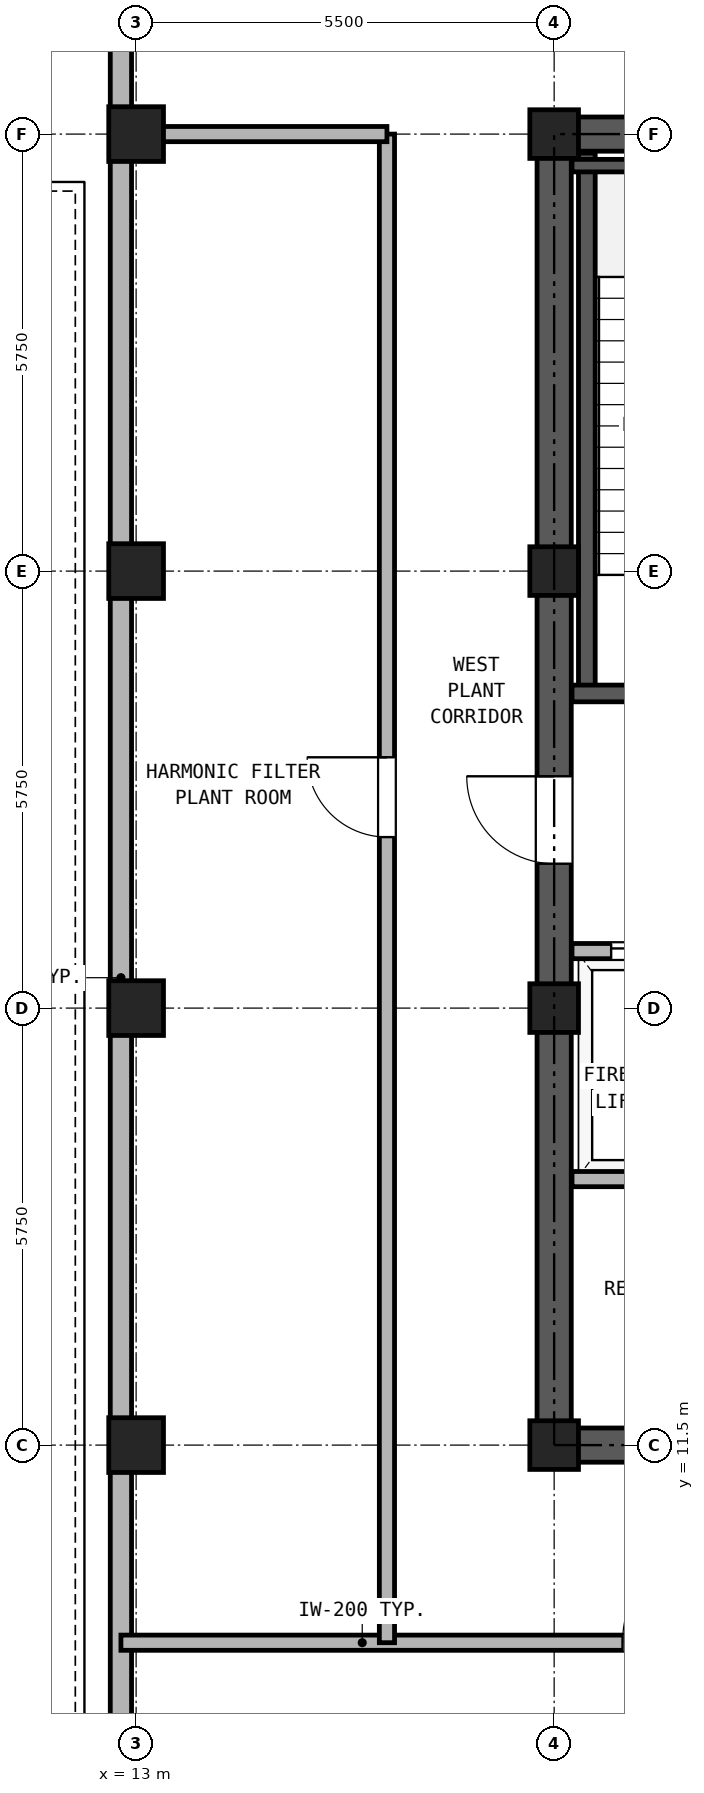
"""IFC4 building model, lengths in metres.
Left out: names, types, materials, properties, quantities, classifications, styles, units other than length and angle.
Written with IfcOpenShell. Run it as: python <this file> out.ifc"""

import sys

from ifc_helpers import new_model, si_unit, direction, frame, frame_2d, origin, origin_2d, place, context, subcontext, project, spatial, rectangle, hollow_rectangle, extrude, source, transform, mapped, element, fill, save


model = new_model("IFC4")
c1 = context("Model", 3, precision=1e-05, world=origin(), true_north=direction((0.0, 1.0)))
c2 = subcontext(c1, "Body", "Model", "MODEL_VIEW")
j1 = project(units=[si_unit("LENGTHUNIT", "METRE"), si_unit("PLANEANGLEUNIT", "RADIAN")], contexts=[c1])
p1 = place(None, origin())
s1 = spatial("IfcSite", under=j1, at=p1, CompositionType="ELEMENT")
p2 = place(p1, origin())
s2 = spatial("IfcBuilding", under=s1, at=p2, CompositionType="ELEMENT")
p3 = place(p2, frame((0.0, 0.0, 188.1)))
s3 = spatial("IfcBuildingStorey", under=s2, at=p3, CompositionType="ELEMENT", Elevation=188.1)
m1 = source(origin(), c2, "Body", "SweptSolid", [
    extrude(hollow_rectangle(XDim=0.72, YDim=0.72, WallThickness=0.04, at=origin_2d()), origin(), (0.0, 0.0, 1.0), 4.85),
])
for number, where, z_axis, x_axis in (
    (1, (13.0, 11.5, 0.0), (0.0, 0.0, 1.0), (1.0, 0.0, 0.0)),
    (2, (13.0, 17.25, 0.0), (0.0, 0.0, 1.0), (1.0, 0.0, 0.0)),
    (3, (13.0, 23.0, 0.0), (0.0, 0.0, 1.0), (1.0, 0.0, 0.0)),
    (4, (13.0, 28.75, 0.0), (0.0, 0.0, 1.0), (1.0, 0.0, 0.0)),
):
    element("IfcColumn", number, at=place(p3, frame(where, z_axis=z_axis, x_axis=x_axis)), inside=s3, PredefinedType="COLUMN", context=c2, shape_type="MappedRepresentation", body=[
        mapped(m1, transform((0.0, 0.0, 0.0), x_axis=(1.0, 0.0, 0.0), y_axis=(0.0, 1.0, 0.0), z_axis=(0.0, 0.0, 1.0), scale=1.0)),
    ])
m2 = source(origin(), c2, "Body", "SweptSolid", [
    extrude(hollow_rectangle(XDim=0.64, YDim=0.64, WallThickness=0.035, at=origin_2d()), origin(), (0.0, 0.0, 1.0), 4.85),
])
for number, where, z_axis, x_axis in (
    (5, (18.5, 11.5, 0.0), (0.0, 0.0, 1.0), (1.0, 0.0, 0.0)),
    (6, (18.5, 17.25, 0.0), (0.0, 0.0, 1.0), (1.0, 0.0, 0.0)),
    (7, (18.5, 23.0, 0.0), (0.0, 0.0, 1.0), (1.0, 0.0, 0.0)),
    (8, (18.5, 28.75, 0.0), (0.0, 0.0, 1.0), (1.0, 0.0, 0.0)),
):
    element("IfcColumn", number, at=place(p3, frame(where, z_axis=z_axis, x_axis=x_axis)), inside=s3, PredefinedType="COLUMN", context=c2, shape_type="MappedRepresentation", body=[
        mapped(m2, transform((0.0, 0.0, 0.0), x_axis=(1.0, 0.0, 0.0), y_axis=(0.0, 1.0, 0.0), z_axis=(0.0, 0.0, 1.0), scale=1.0)),
    ])
p4 = place(p3, frame((18.275, 11.5, 0.0), z_axis=(0.0, 0.0, 1.0), x_axis=(1.0, 0.0, 0.0)))
e9 = element("IfcWall", 9, at=p4, inside=s3, PredefinedType="SHEAR", context=c2, shape_type="SweptSolid", body=[
    extrude(rectangle(XDim=10.45, YDim=0.45, at=frame_2d((5.225, 0.0))), origin(), (0.0, 0.0, 1.0), 4.85),
])
p5 = place(p4, frame((1.825, 0.0, 0.0)))
e10 = element("IfcOpeningElement", 10, at=p5, cuts=e9, PredefinedType="OPENING", context=c2, shape_type="SweptSolid", body=[
    extrude(rectangle(XDim=0.95, YDim=2.15, at=frame_2d((0.475, 1.075))), frame((0.0, 0.235, 0.0), z_axis=(0.0, -1.0, 0.0), x_axis=(1.0, 0.0, 0.0)), (0.0, 0.0, 1.0), 0.47),
])
p6 = place(p4, frame((5.325, 0.0, 0.0)))
e11 = element("IfcOpeningElement", 11, at=p6, cuts=e9, PredefinedType="OPENING", context=c2, shape_type="SweptSolid", body=[
    extrude(rectangle(XDim=0.95, YDim=2.15, at=frame_2d((0.475, 1.075))), frame((0.0, 0.235, 0.0), z_axis=(0.0, -1.0, 0.0), x_axis=(1.0, 0.0, 0.0)), (0.0, 0.0, 1.0), 0.47),
])
p7 = place(p4, frame((8.225, 0.0, 0.0)))
e12 = element("IfcOpeningElement", 12, at=p7, cuts=e9, PredefinedType="OPENING", context=c2, shape_type="SweptSolid", body=[
    extrude(rectangle(XDim=1.1, YDim=2.25, at=frame_2d((0.55, 1.125))), frame((0.0, 0.235, 0.0), z_axis=(0.0, -1.0, 0.0), x_axis=(1.0, 0.0, 0.0)), (0.0, 0.0, 1.0), 0.47),
])
p8 = place(p3, frame((18.275, 28.75, 0.0), z_axis=(0.0, 0.0, 1.0), x_axis=(1.0, 0.0, 0.0)))
e13 = element("IfcWall", 13, at=p8, inside=s3, PredefinedType="SHEAR", context=c2, shape_type="SweptSolid", body=[
    extrude(rectangle(XDim=10.45, YDim=0.45, at=frame_2d((5.225, 0.0))), origin(), (0.0, 0.0, 1.0), 4.85),
])
p9 = place(p8, frame((4.105, 0.0, 0.0)))
e14 = element("IfcOpeningElement", 14, at=p9, cuts=e13, PredefinedType="OPENING", context=c2, shape_type="SweptSolid", body=[
    extrude(rectangle(XDim=0.9, YDim=2.05, at=frame_2d((0.45, 1.025))), frame((0.0, 0.235, 0.0), z_axis=(0.0, -1.0, 0.0), x_axis=(1.0, 0.0, 0.0)), (0.0, 0.0, 1.0), 0.47),
])
p10 = place(p8, frame((5.645, 0.0, 0.0)))
e15 = element("IfcOpeningElement", 15, at=p10, cuts=e13, PredefinedType="OPENING", context=c2, shape_type="SweptSolid", body=[
    extrude(rectangle(XDim=0.9, YDim=2.05, at=frame_2d((0.45, 1.025))), frame((0.0, 0.235, 0.0), z_axis=(0.0, -1.0, 0.0), x_axis=(1.0, 0.0, 0.0)), (0.0, 0.0, 1.0), 0.47),
])
p11 = place(p3, frame((18.5, 11.725, 0.0), z_axis=(0.0, 0.0, 1.0), x_axis=(0.0, 1.0, 0.0)))
e16 = element("IfcWall", 16, at=p11, inside=s3, PredefinedType="SHEAR", context=c2, shape_type="SweptSolid", body=[
    extrude(rectangle(XDim=16.8, YDim=0.45, at=frame_2d((8.4, 0.0))), origin(), (0.0, 0.0, 1.0), 4.85),
])
p12 = place(p11, frame((7.425, 0.0, 0.0)))
e17 = element("IfcOpeningElement", 17, at=p12, cuts=e16, PredefinedType="OPENING", context=c2, shape_type="SweptSolid", body=[
    extrude(rectangle(XDim=1.15, YDim=2.2, at=frame_2d((0.575, 1.1))), frame((0.0, 0.235, 0.0), z_axis=(0.0, -1.0, 0.0), x_axis=(1.0, 0.0, 0.0)), (0.0, 0.0, 1.0), 0.47),
])
p13 = place(p3, frame((18.93, 21.39, 0.0), z_axis=(0.0, 0.0, 1.0), x_axis=(0.0, 1.0, 0.0)))
e18 = element("IfcWall", 18, at=p13, inside=s3, PredefinedType="SOLIDWALL", context=c2, shape_type="SweptSolid", body=[
    extrude(rectangle(XDim=7.11, YDim=0.22, at=frame_2d((3.555, 0.0))), origin(), (0.0, 0.0, 1.0), 4.85),
])
p14 = place(p3, frame((18.735, 28.335, 0.0), z_axis=(0.0, 0.0, 1.0), x_axis=(1.0, 0.0, 0.0)))
e19 = element("IfcWall", 19, at=p14, inside=s3, PredefinedType="PARTITIONING", context=c2, shape_type="SweptSolid", body=[
    extrude(rectangle(XDim=3.375, YDim=0.165, at=frame_2d((1.688, 0.0))), origin(), (0.0, 0.0, 1.0), 4.85),
])
p15 = place(p3, frame((18.735, 21.39, 0.0), z_axis=(0.0, 0.0, 1.0), x_axis=(1.0, 0.0, 0.0)))
e20 = element("IfcWall", 20, at=p15, inside=s3, PredefinedType="SOLIDWALL", context=c2, shape_type="SweptSolid", body=[
    extrude(rectangle(XDim=6.395, YDim=0.22, at=frame_2d((3.197, 0.0))), origin(), (0.0, 0.0, 1.0), 4.85),
])
p16 = place(p15, frame((1.115, 0.0, 0.0)))
e21 = element("IfcOpeningElement", 21, at=p16, cuts=e20, PredefinedType="OPENING", context=c2, shape_type="SweptSolid", body=[
    extrude(rectangle(XDim=1.15, YDim=2.2, at=frame_2d((0.575, 1.1))), frame((0.0, 0.12, 0.0), z_axis=(0.0, -1.0, 0.0), x_axis=(1.0, 0.0, 0.0)), (0.0, 0.0, 1.0), 0.24),
])
p17 = place(p15, frame((4.845, 0.0, 0.0)))
e22 = element("IfcOpeningElement", 22, at=p17, cuts=e20, PredefinedType="OPENING", context=c2, shape_type="SweptSolid", body=[
    extrude(rectangle(XDim=1.1, YDim=2.25, at=frame_2d((0.55, 1.125))), frame((0.0, 0.12, 0.0), z_axis=(0.0, -1.0, 0.0), x_axis=(1.0, 0.0, 0.0)), (0.0, 0.0, 1.0), 0.24),
])
p18 = place(p3, frame((18.735, 18.0, 0.0), z_axis=(0.0, 0.0, 1.0), x_axis=(1.0, 0.0, 0.0)))
e23 = element("IfcWall", 23, at=p18, inside=s3, PredefinedType="PARTITIONING", context=c2, shape_type="SweptSolid", body=[
    extrude(rectangle(XDim=9.53, YDim=0.2, at=frame_2d((4.765, 0.0))), origin(), (0.0, 0.0, 1.0), 4.85),
])
p19 = place(p18, frame((0.515, 0.0, 0.0)))
e24 = element("IfcOpeningElement", 24, at=p19, cuts=e23, PredefinedType="OPENING", context=c2, shape_type="SweptSolid", body=[
    extrude(rectangle(XDim=1.3, YDim=2.3, at=frame_2d((0.65, 1.15))), frame((0.0, 0.11, 0.0), z_axis=(0.0, -1.0, 0.0), x_axis=(1.0, 0.0, 0.0)), (0.0, 0.0, 1.0), 0.22),
])
p20 = place(p18, frame((2.615, 0.0, 0.0)))
e25 = element("IfcOpeningElement", 25, at=p20, cuts=e23, PredefinedType="OPENING", context=c2, shape_type="SweptSolid", body=[
    extrude(rectangle(XDim=1.3, YDim=2.3, at=frame_2d((0.65, 1.15))), frame((0.0, 0.11, 0.0), z_axis=(0.0, -1.0, 0.0), x_axis=(1.0, 0.0, 0.0)), (0.0, 0.0, 1.0), 0.22),
])
p21 = place(p18, frame((7.115, 0.0, 0.0)))
e26 = element("IfcOpeningElement", 26, at=p21, cuts=e23, PredefinedType="OPENING", context=c2, shape_type="SweptSolid", body=[
    extrude(rectangle(XDim=1.0, YDim=2.15, at=frame_2d((0.5, 1.075))), frame((0.0, 0.11, 0.0), z_axis=(0.0, -1.0, 0.0), x_axis=(1.0, 0.0, 0.0)), (0.0, 0.0, 1.0), 0.22),
])
p22 = place(p3, frame((18.735, 15.0, 0.0), z_axis=(0.0, 0.0, 1.0), x_axis=(1.0, 0.0, 0.0)))
e27 = element("IfcWall", 27, at=p22, inside=s3, PredefinedType="PARTITIONING", context=c2, shape_type="SweptSolid", body=[
    extrude(rectangle(XDim=9.53, YDim=0.2, at=frame_2d((4.765, 0.0))), origin(), (0.0, 0.0, 1.0), 4.85),
])
p23 = place(p3, frame((12.8, 0.25, 0.0), z_axis=(0.0, 0.0, 1.0), x_axis=(0.0, 1.0, 0.0)))
e28 = element("IfcWall", 28, at=p23, inside=s3, PredefinedType="SOLIDWALL", context=c2, shape_type="SweptSolid", body=[
    extrude(rectangle(XDim=34.8, YDim=0.28, at=frame_2d((17.4, 0.0))), origin(), (0.0, 0.0, 1.0), 4.223),
])
p24 = place(p3, frame((12.8, 8.9, 0.0), z_axis=(0.0, 0.0, 1.0), x_axis=(1.0, 0.0, 0.0)))
e29 = element("IfcWall", 29, at=p24, inside=s3, PredefinedType="PARTITIONING", context=c2, shape_type="SweptSolid", body=[
    extrude(rectangle(XDim=21.4, YDim=0.2, at=frame_2d((10.7, 0.0))), origin(), (0.0, 0.0, 1.0), 4.85),
])
p25 = place(p24, frame((6.6, 0.0, 0.0)))
e30 = element("IfcOpeningElement", 30, at=p25, cuts=e29, PredefinedType="OPENING", context=c2, shape_type="SweptSolid", body=[
    extrude(rectangle(XDim=1.5, YDim=2.25, at=frame_2d((0.75, 1.125))), frame((0.0, 0.11, 0.0), z_axis=(0.0, -1.0, 0.0), x_axis=(1.0, 0.0, 0.0)), (0.0, 0.0, 1.0), 0.22),
])
p26 = place(p24, frame((13.8, 0.0, 0.0)))
e31 = element("IfcOpeningElement", 31, at=p26, cuts=e29, PredefinedType="OPENING", context=c2, shape_type="SweptSolid", body=[
    extrude(rectangle(XDim=1.5, YDim=2.25, at=frame_2d((0.75, 1.125))), frame((0.0, 0.11, 0.0), z_axis=(0.0, -1.0, 0.0), x_axis=(1.0, 0.0, 0.0)), (0.0, 0.0, 1.0), 0.22),
])
p27 = place(p3, frame((16.3, 8.9, 0.0), z_axis=(0.0, 0.0, 1.0), x_axis=(0.0, 1.0, 0.0)))
e32 = element("IfcWall", 32, at=p27, inside=s3, PredefinedType="PARTITIONING", context=c2, shape_type="SweptSolid", body=[
    extrude(rectangle(XDim=19.85, YDim=0.2, at=frame_2d((9.925, 0.0))), origin(), (0.0, 0.0, 1.0), 4.85),
])
p28 = place(p27, frame((10.6, 0.0, 0.0)))
e33 = element("IfcOpeningElement", 33, at=p28, cuts=e32, PredefinedType="OPENING", context=c2, shape_type="SweptSolid", body=[
    extrude(rectangle(XDim=1.05, YDim=2.15, at=frame_2d((0.525, 1.075))), frame((0.0, 0.11, 0.0), z_axis=(0.0, -1.0, 0.0), x_axis=(1.0, 0.0, 0.0)), (0.0, 0.0, 1.0), 0.22),
])
p29 = place(p3, frame((12.8, 28.75, 0.0), z_axis=(0.0, 0.0, 1.0), x_axis=(1.0, 0.0, 0.0)))
e34 = element("IfcWall", 34, at=p29, inside=s3, PredefinedType="PARTITIONING", context=c2, shape_type="SweptSolid", body=[
    extrude(rectangle(XDim=3.5, YDim=0.2, at=frame_2d((1.75, 0.0))), origin(), (0.0, 0.0, 1.0), 4.223),
])
p30 = place(p19, origin())
e35 = element("IfcDoor", 35, at=p30, inside=s3, OperationType="DOUBLE_DOOR_SLIDING", PredefinedType="DOOR", context=c2, shape_type="SweptSolid", body=[
    extrude(rectangle(XDim=1.3, YDim=2.3, at=frame_2d((0.65, 1.15))), frame((0.0, 0.025, 0.0), z_axis=(0.0, -1.0, 0.0), x_axis=(1.0, 0.0, 0.0)), (0.0, 0.0, 1.0), 0.05),
])
fill(e24, e35)
p31 = place(p12, frame((1.15, 0.0, 0.0), z_axis=(0.0, 0.0, 1.0), x_axis=(-1.0, 0.0, 0.0)))
e36 = element("IfcDoor", 36, at=p31, inside=s3, OperationType="SINGLE_SWING_RIGHT", PredefinedType="DOOR", context=c2, shape_type="SweptSolid", body=[
    extrude(rectangle(XDim=1.15, YDim=2.2, at=frame_2d((0.575, 1.1))), frame((0.0, 0.025, 0.0), z_axis=(0.0, -1.0, 0.0), x_axis=(1.0, 0.0, 0.0)), (0.0, 0.0, 1.0), 0.05),
])
fill(e17, e36)
p32 = place(p25, frame((1.5, 0.0, 0.0), z_axis=(0.0, 0.0, 1.0), x_axis=(-1.0, 0.0, 0.0)))
e37 = element("IfcDoor", 37, at=p32, inside=s3, OperationType="SINGLE_SWING_RIGHT", PredefinedType="DOOR", context=c2, shape_type="SweptSolid", body=[
    extrude(rectangle(XDim=1.5, YDim=2.25, at=frame_2d((0.75, 1.125))), frame((0.0, 0.025, 0.0), z_axis=(0.0, -1.0, 0.0), x_axis=(1.0, 0.0, 0.0)), (0.0, 0.0, 1.0), 0.05),
])
fill(e30, e37)
p33 = place(p28, frame((1.05, 0.0, 0.0), z_axis=(0.0, 0.0, 1.0), x_axis=(-1.0, 0.0, 0.0)))
e38 = element("IfcDoor", 38, at=p33, inside=s3, OperationType="SINGLE_SWING_RIGHT", PredefinedType="DOOR", context=c2, shape_type="SweptSolid", body=[
    extrude(rectangle(XDim=1.05, YDim=2.15, at=frame_2d((0.525, 1.075))), frame((0.0, 0.025, 0.0), z_axis=(0.0, -1.0, 0.0), x_axis=(1.0, 0.0, 0.0)), (0.0, 0.0, 1.0), 0.05),
])
fill(e33, e38)
save(model, sys.argv[1])
